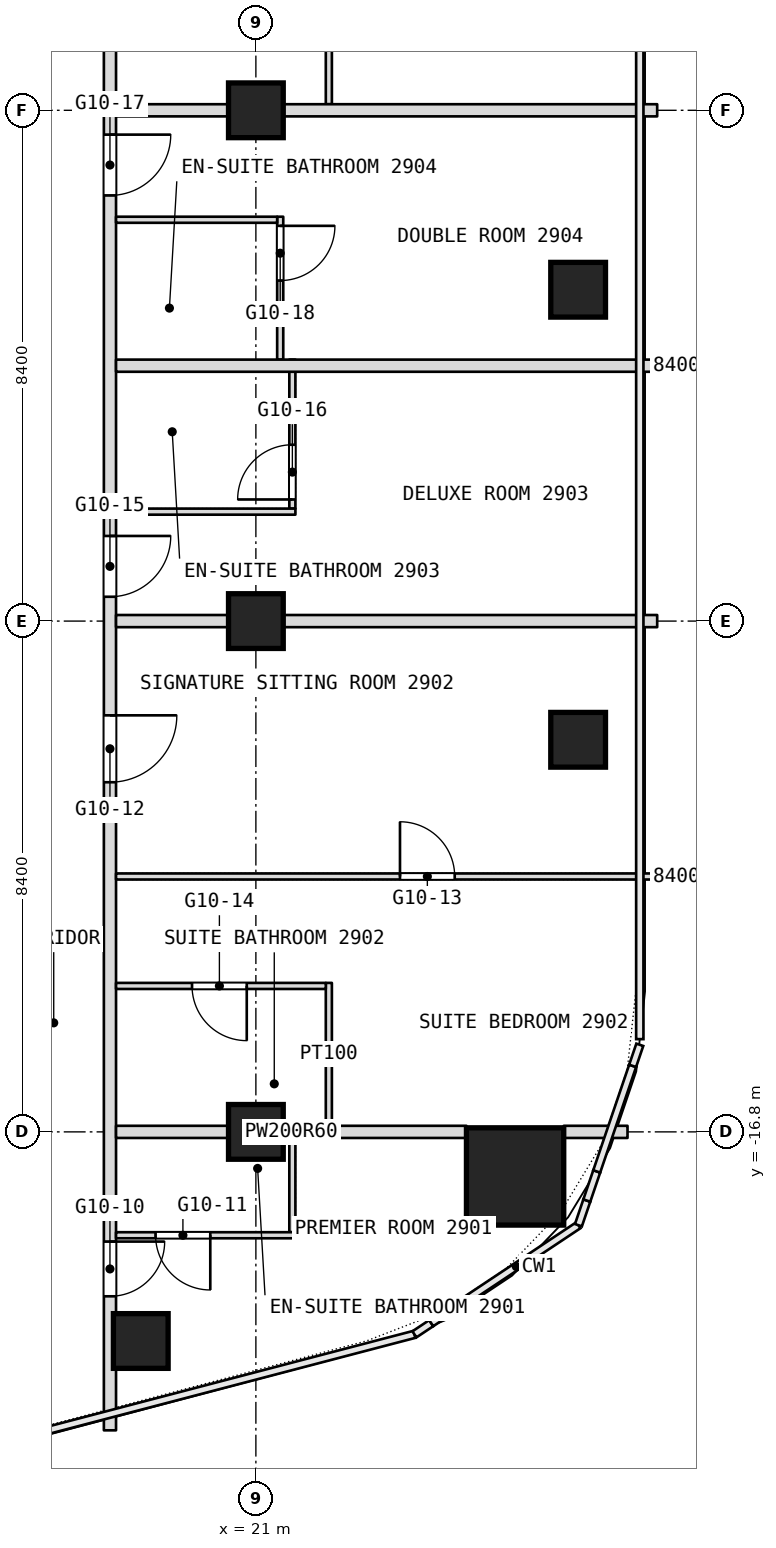
"""IFC4 building model, lengths in metres.
Left out: names, types, materials, properties, quantities, classifications, styles, units other than length and angle.
Written with IfcOpenShell. Run it as: python <this file> out.ifc"""

import sys

from ifc_helpers import new_model, si_unit, direction, frame, frame_2d, origin, origin_2d, place, context, subcontext, project, spatial, rectangle, extrude, element, fill, save


model = new_model("IFC4")
c1 = context("Model", 3, precision=1e-05, world=origin(), true_north=direction((0.0, 1.0)))
c2 = subcontext(c1, "Body", "Model", "MODEL_VIEW")
j1 = project(units=[si_unit("LENGTHUNIT", "METRE"), si_unit("PLANEANGLEUNIT", "RADIAN")], contexts=[c1])
p1 = place(None, origin())
s1 = spatial("IfcSite", under=j1, at=p1, CompositionType="ELEMENT")
p2 = place(p1, origin())
s2 = spatial("IfcBuilding", under=s1, at=p2, CompositionType="ELEMENT")
p3 = place(p2, frame((0.0, 0.0, 130.1)))
s3 = spatial("IfcBuildingStorey", under=s2, at=p3, CompositionType="ELEMENT", Elevation=130.1)
p4 = place(p3, frame((25.263, -17.533, 0.0), z_axis=(0.0, 0.0, 1.0), x_axis=(1.0, 0.0, 0.0)))
e1 = element("IfcColumn", 1, at=p4, inside=s3, PredefinedType="COLUMN", context=c2, shape_type="SweptSolid", body=[
    extrude(rectangle(XDim=1.6, YDim=1.6, at=origin_2d()), origin(), (0.0, 0.0, 1.0), 3.6),
])
for number, where, z_axis, x_axis in (
    (2, (21.0, -16.8, 0.0), (0.0, 0.0, 1.0), (1.0, 0.0, 0.0)),
    (3, (21.0, -8.4, 0.0), (0.0, 0.0, 1.0), (1.0, 0.0, 0.0)),
    (4, (21.0, 0.0, 0.0), (0.0, 0.0, 1.0), (1.0, 0.0, 0.0)),
    (5, (26.3, -2.951, 0.0), (0.0, 0.0, 1.0), (1.0, 0.0, 0.0)),
    (6, (26.3, -10.352, 0.0), (0.0, 0.0, 1.0), (1.0, 0.0, 0.0)),
    (7, (19.107, -20.239, 0.0), (0.0, 0.0, 1.0), (1.0, 0.0, 0.0)),
):
    element("IfcColumn", number, at=place(p3, frame(where, z_axis=z_axis, x_axis=x_axis)), inside=s3, PredefinedType="COLUMN", context=c2, shape_type="SweptSolid", body=[
        extrude(rectangle(XDim=0.9, YDim=0.9, at=origin_2d()), origin(), (0.0, 0.0, 1.0), 3.6),
    ])
p5 = place(p3, frame((22.2, -16.7, 0.0), z_axis=(0.0, 0.0, 1.0), x_axis=(0.0, 1.0, 0.0)))
e8 = element("IfcWall", 8, at=p5, inside=s3, PredefinedType="PARTITIONING", context=c2, shape_type="SweptSolid", body=[
    extrude(rectangle(XDim=2.35, YDim=0.1, at=frame_2d((1.175, 0.0))), origin(), (0.0, 0.0, 1.0), 3.34),
])
p6 = place(p3, frame((22.2, 0.1, 0.0), z_axis=(0.0, 0.0, 1.0), x_axis=(0.0, 1.0, 0.0)))
e9 = element("IfcWall", 9, at=p6, inside=s3, PredefinedType="PARTITIONING", context=c2, shape_type="SweptSolid", body=[
    extrude(rectangle(XDim=3.55, YDim=0.1, at=frame_2d((1.775, 0.0))), origin(), (0.0, 0.0, 1.0), 3.34),
])
p7 = place(p6, frame((2.5, 0.0, 0.0)))
e10 = element("IfcOpeningElement", 10, at=p7, cuts=e9, PredefinedType="OPENING", context=c2, shape_type="SweptSolid", body=[
    extrude(rectangle(XDim=0.9, YDim=2.1, at=frame_2d((0.45, 1.05))), frame((0.0, 0.05, 0.0), z_axis=(0.0, -1.0, 0.0), x_axis=(1.0, 0.0, 0.0)), (0.0, 0.0, 1.0), 0.1),
])
p8 = place(p3, frame((21.6, -18.45, 0.0), z_axis=(0.0, 0.0, 1.0), x_axis=(0.0, 1.0, 0.0)))
e11 = element("IfcWall", 11, at=p8, inside=s3, PredefinedType="PARTITIONING", context=c2, shape_type="SweptSolid", body=[
    extrude(rectangle(XDim=1.75, YDim=0.1, at=frame_2d((0.875, 0.0))), origin(), (0.0, 0.0, 1.0), 3.34),
])
p9 = place(p3, frame((21.6, -6.55, 0.0), z_axis=(0.0, 0.0, 1.0), x_axis=(0.0, 1.0, 0.0)))
e12 = element("IfcWall", 12, at=p9, inside=s3, PredefinedType="PARTITIONING", context=c2, shape_type="SweptSolid", body=[
    extrude(rectangle(XDim=2.45, YDim=0.1, at=frame_2d((1.225, 0.0))), origin(), (0.0, 0.0, 1.0), 3.34),
])
p10 = place(p9, frame((0.15, 0.0, 0.0)))
e13 = element("IfcOpeningElement", 13, at=p10, cuts=e12, PredefinedType="OPENING", context=c2, shape_type="SweptSolid", body=[
    extrude(rectangle(XDim=0.9, YDim=2.1, at=frame_2d((0.45, 1.05))), frame((0.0, 0.05, 0.0), z_axis=(0.0, -1.0, 0.0), x_axis=(1.0, 0.0, 0.0)), (0.0, 0.0, 1.0), 0.1),
])
p11 = place(p3, frame((21.4, -4.1, 0.0), z_axis=(0.0, 0.0, 1.0), x_axis=(0.0, 1.0, 0.0)))
e14 = element("IfcWall", 14, at=p11, inside=s3, PredefinedType="PARTITIONING", context=c2, shape_type="SweptSolid", body=[
    extrude(rectangle(XDim=2.35, YDim=0.1, at=frame_2d((1.175, 0.0))), origin(), (0.0, 0.0, 1.0), 3.34),
])
p12 = place(p11, frame((1.3, 0.0, 0.0)))
e15 = element("IfcOpeningElement", 15, at=p12, cuts=e14, PredefinedType="OPENING", context=c2, shape_type="SweptSolid", body=[
    extrude(rectangle(XDim=0.9, YDim=2.1, at=frame_2d((0.45, 1.05))), frame((0.0, 0.05, 0.0), z_axis=(0.0, -1.0, 0.0), x_axis=(1.0, 0.0, 0.0)), (0.0, 0.0, 1.0), 0.1),
])
p13 = place(p3, frame((18.6, -21.708, 0.0), z_axis=(0.0, 0.0, 1.0), x_axis=(0.0, 1.0, 0.0)))
e16 = element("IfcWall", 16, at=p13, inside=s3, PredefinedType="PARTITIONING", context=c2, shape_type="SweptSolid", body=[
    extrude(rectangle(XDim=49.648, YDim=0.2, at=frame_2d((24.824, 0.0))), origin(), (0.0, 0.0, 1.0), 3.34),
])
p14 = place(p13, frame((2.204, 0.0, 0.0)))
e17 = element("IfcOpeningElement", 17, at=p14, cuts=e16, PredefinedType="OPENING", context=c2, shape_type="SweptSolid", body=[
    extrude(rectangle(XDim=0.9, YDim=2.1, at=frame_2d((0.45, 1.05))), frame((0.0, 0.1, 0.0), z_axis=(0.0, -1.0, 0.0), x_axis=(1.0, 0.0, 0.0)), (0.0, 0.0, 1.0), 0.2),
])
p15 = place(p13, frame((10.658, 0.0, 0.0)))
e18 = element("IfcOpeningElement", 18, at=p15, cuts=e16, PredefinedType="OPENING", context=c2, shape_type="SweptSolid", body=[
    extrude(rectangle(XDim=1.1, YDim=2.1, at=frame_2d((0.55, 1.05))), frame((0.0, 0.1, 0.0), z_axis=(0.0, -1.0, 0.0), x_axis=(1.0, 0.0, 0.0)), (0.0, 0.0, 1.0), 0.2),
])
p16 = place(p13, frame((13.708, 0.0, 0.0)))
e19 = element("IfcOpeningElement", 19, at=p16, cuts=e16, PredefinedType="OPENING", context=c2, shape_type="SweptSolid", body=[
    extrude(rectangle(XDim=1.0, YDim=2.1, at=frame_2d((0.5, 1.05))), frame((0.0, 0.1, 0.0), z_axis=(0.0, -1.0, 0.0), x_axis=(1.0, 0.0, 0.0)), (0.0, 0.0, 1.0), 0.2),
])
p17 = place(p13, frame((20.308, 0.0, 0.0)))
e20 = element("IfcOpeningElement", 20, at=p17, cuts=e16, PredefinedType="OPENING", context=c2, shape_type="SweptSolid", body=[
    extrude(rectangle(XDim=1.0, YDim=2.1, at=frame_2d((0.5, 1.05))), frame((0.0, 0.1, 0.0), z_axis=(0.0, -1.0, 0.0), x_axis=(1.0, 0.0, 0.0)), (0.0, 0.0, 1.0), 0.2),
])
p18 = place(p13, frame((25.408, 0.0, 0.0)))
e21 = element("IfcOpeningElement", 21, at=p18, cuts=e16, PredefinedType="OPENING", context=c2, shape_type="SweptSolid", body=[
    extrude(rectangle(XDim=1.1, YDim=2.1, at=frame_2d((0.55, 1.05))), frame((0.0, 0.1, 0.0), z_axis=(0.0, -1.0, 0.0), x_axis=(1.0, 0.0, 0.0)), (0.0, 0.0, 1.0), 0.2),
])
p19 = place(p13, frame((30.508, 0.0, 0.0)))
e22 = element("IfcOpeningElement", 22, at=p19, cuts=e16, PredefinedType="OPENING", context=c2, shape_type="SweptSolid", body=[
    extrude(rectangle(XDim=1.0, YDim=2.1, at=frame_2d((0.5, 1.05))), frame((0.0, 0.1, 0.0), z_axis=(0.0, -1.0, 0.0), x_axis=(1.0, 0.0, 0.0)), (0.0, 0.0, 1.0), 0.2),
])
p20 = place(p13, frame((37.108, 0.0, 0.0)))
e23 = element("IfcOpeningElement", 23, at=p20, cuts=e16, PredefinedType="OPENING", context=c2, shape_type="SweptSolid", body=[
    extrude(rectangle(XDim=1.0, YDim=2.1, at=frame_2d((0.5, 1.05))), frame((0.0, 0.1, 0.0), z_axis=(0.0, -1.0, 0.0), x_axis=(1.0, 0.0, 0.0)), (0.0, 0.0, 1.0), 0.2),
])
p21 = place(p13, frame((42.608, 0.0, 0.0)))
e24 = element("IfcOpeningElement", 24, at=p21, cuts=e16, PredefinedType="OPENING", context=c2, shape_type="SweptSolid", body=[
    extrude(rectangle(XDim=1.0, YDim=2.1, at=frame_2d((0.5, 1.05))), frame((0.0, 0.1, 0.0), z_axis=(0.0, -1.0, 0.0), x_axis=(1.0, 0.0, 0.0)), (0.0, 0.0, 1.0), 0.2),
])
p22 = place(p13, frame((44.608, 0.0, 0.0)))
e25 = element("IfcOpeningElement", 25, at=p22, cuts=e16, PredefinedType="OPENING", context=c2, shape_type="SweptSolid", body=[
    extrude(rectangle(XDim=1.0, YDim=2.1, at=frame_2d((0.5, 1.05))), frame((0.0, 0.1, 0.0), z_axis=(0.0, -1.0, 0.0), x_axis=(1.0, 0.0, 0.0)), (0.0, 0.0, 1.0), 0.2),
])
p23 = place(p3, frame((18.7, -18.5, 0.0), z_axis=(0.0, 0.0, 1.0), x_axis=(1.0, 0.0, 0.0)))
e26 = element("IfcWall", 26, at=p23, inside=s3, PredefinedType="PARTITIONING", context=c2, shape_type="SweptSolid", body=[
    extrude(rectangle(XDim=2.95, YDim=0.1, at=frame_2d((1.475, 0.0))), origin(), (0.0, 0.0, 1.0), 3.34),
])
p24 = place(p23, frame((0.65, 0.0, 0.0)))
e27 = element("IfcOpeningElement", 27, at=p24, cuts=e26, PredefinedType="OPENING", context=c2, shape_type="SweptSolid", body=[
    extrude(rectangle(XDim=0.9, YDim=2.1, at=frame_2d((0.45, 1.05))), frame((0.0, 0.05, 0.0), z_axis=(0.0, -1.0, 0.0), x_axis=(1.0, 0.0, 0.0)), (0.0, 0.0, 1.0), 0.1),
])
p25 = place(p3, frame((18.7, -16.8, 0.0), z_axis=(0.0, 0.0, 1.0), x_axis=(1.0, 0.0, 0.0)))
e28 = element("IfcWall", 28, at=p25, inside=s3, PredefinedType="PARTITIONING", context=c2, shape_type="SweptSolid", body=[
    extrude(rectangle(XDim=5.763, YDim=0.2, at=frame_2d((2.881, 0.0))), origin(), (0.0, 0.0, 1.0), 2.89),
])
p26 = place(p3, frame((26.063, -16.8, 0.0), z_axis=(0.0, 0.0, 1.0), x_axis=(1.0, 0.0, 0.0)))
e29 = element("IfcWall", 29, at=p26, inside=s3, PredefinedType="PARTITIONING", context=c2, shape_type="SweptSolid", body=[
    extrude(rectangle(XDim=1.049, YDim=0.2, at=frame_2d((0.524, 0.0))), origin(), (0.0, 0.0, 1.0), 3.34),
])
p27 = place(p3, frame((18.7, -14.4, 0.0), z_axis=(0.0, 0.0, 1.0), x_axis=(1.0, 0.0, 0.0)))
e30 = element("IfcWall", 30, at=p27, inside=s3, PredefinedType="PARTITIONING", context=c2, shape_type="SweptSolid", body=[
    extrude(rectangle(XDim=3.45, YDim=0.1, at=frame_2d((1.725, 0.0))), origin(), (0.0, 0.0, 1.0), 3.34),
])
p28 = place(p27, frame((1.25, 0.0, 0.0)))
e31 = element("IfcOpeningElement", 31, at=p28, cuts=e30, PredefinedType="OPENING", context=c2, shape_type="SweptSolid", body=[
    extrude(rectangle(XDim=0.9, YDim=2.1, at=frame_2d((0.45, 1.05))), frame((0.0, 0.05, 0.0), z_axis=(0.0, -1.0, 0.0), x_axis=(1.0, 0.0, 0.0)), (0.0, 0.0, 1.0), 0.1),
])
p29 = place(p3, frame((18.7, -12.6, 0.0), z_axis=(0.0, 0.0, 1.0), x_axis=(1.0, 0.0, 0.0)))
e32 = element("IfcWall", 32, at=p29, inside=s3, PredefinedType="PARTITIONING", context=c2, shape_type="SweptSolid", body=[
    extrude(rectangle(XDim=8.9, YDim=0.1, at=frame_2d((4.45, 0.0))), origin(), (0.0, 0.0, 1.0), 3.34),
])
p30 = place(p29, frame((4.67, 0.0, 0.0)))
e33 = element("IfcOpeningElement", 33, at=p30, cuts=e32, PredefinedType="OPENING", context=c2, shape_type="SweptSolid", body=[
    extrude(rectangle(XDim=0.9, YDim=2.1, at=frame_2d((0.45, 1.05))), frame((0.0, 0.05, 0.0), z_axis=(0.0, -1.0, 0.0), x_axis=(1.0, 0.0, 0.0)), (0.0, 0.0, 1.0), 0.1),
])
p31 = place(p3, frame((18.7, -8.4, 0.0), z_axis=(0.0, 0.0, 1.0), x_axis=(1.0, 0.0, 0.0)))
e34 = element("IfcWall", 34, at=p31, inside=s3, PredefinedType="PARTITIONING", context=c2, shape_type="SweptSolid", body=[
    extrude(rectangle(XDim=8.9, YDim=0.2, at=frame_2d((4.45, 0.0))), origin(), (0.0, 0.0, 1.0), 2.89),
])
p32 = place(p3, frame((18.7, -6.6, 0.0), z_axis=(0.0, 0.0, 1.0), x_axis=(1.0, 0.0, 0.0)))
e35 = element("IfcWall", 35, at=p32, inside=s3, PredefinedType="PARTITIONING", context=c2, shape_type="SweptSolid", body=[
    extrude(rectangle(XDim=2.95, YDim=0.1, at=frame_2d((1.475, 0.0))), origin(), (0.0, 0.0, 1.0), 3.34),
])
p33 = place(p3, frame((18.7, -4.2, 0.0), z_axis=(0.0, 0.0, 1.0), x_axis=(1.0, 0.0, 0.0)))
e36 = element("IfcWall", 36, at=p33, inside=s3, PredefinedType="PARTITIONING", context=c2, shape_type="SweptSolid", body=[
    extrude(rectangle(XDim=8.9, YDim=0.2, at=frame_2d((4.45, 0.0))), origin(), (0.0, 0.0, 1.0), 3.34),
])
p34 = place(p3, frame((18.7, -1.8, 0.0), z_axis=(0.0, 0.0, 1.0), x_axis=(1.0, 0.0, 0.0)))
e37 = element("IfcWall", 37, at=p34, inside=s3, PredefinedType="PARTITIONING", context=c2, shape_type="SweptSolid", body=[
    extrude(rectangle(XDim=2.65, YDim=0.1, at=frame_2d((1.325, 0.0))), origin(), (0.0, 0.0, 1.0), 3.34),
])
p35 = place(p3, frame((18.7, 0.0, 0.0), z_axis=(0.0, 0.0, 1.0), x_axis=(1.0, 0.0, 0.0)))
e38 = element("IfcWall", 38, at=p35, inside=s3, PredefinedType="PARTITIONING", context=c2, shape_type="SweptSolid", body=[
    extrude(rectangle(XDim=8.9, YDim=0.2, at=frame_2d((4.45, 0.0))), origin(), (0.0, 0.0, 1.0), 2.89),
])
p36 = place(p10, origin())
e39 = element("IfcDoor", 39, at=p36, inside=s3, OperationType="SINGLE_SWING_LEFT", PredefinedType="DOOR", context=c2, shape_type="SweptSolid", body=[
    extrude(rectangle(XDim=0.9, YDim=2.1, at=frame_2d((0.45, 1.05))), frame((0.0, 0.025, 0.0), z_axis=(0.0, -1.0, 0.0), x_axis=(1.0, 0.0, 0.0)), (0.0, 0.0, 1.0), 0.05),
])
fill(e13, e39)
p37 = place(p12, origin())
e40 = element("IfcDoor", 40, at=p37, inside=s3, OperationType="SINGLE_SWING_RIGHT", PredefinedType="DOOR", context=c2, shape_type="SweptSolid", body=[
    extrude(rectangle(XDim=0.9, YDim=2.1, at=frame_2d((0.45, 1.05))), frame((0.0, 0.025, 0.0), z_axis=(0.0, -1.0, 0.0), x_axis=(1.0, 0.0, 0.0)), (0.0, 0.0, 1.0), 0.05),
])
fill(e15, e40)
p38 = place(p14, origin())
e41 = element("IfcDoor", 41, at=p38, inside=s3, OperationType="SINGLE_SWING_LEFT", PredefinedType="DOOR", context=c2, shape_type="SweptSolid", body=[
    extrude(rectangle(XDim=0.9, YDim=2.1, at=frame_2d((0.45, 1.05))), frame((0.0, 0.025, 0.0), z_axis=(0.0, -1.0, 0.0), x_axis=(1.0, 0.0, 0.0)), (0.0, 0.0, 1.0), 0.05),
])
fill(e17, e41)
p39 = place(p15, origin())
e42 = element("IfcDoor", 42, at=p39, inside=s3, OperationType="SINGLE_SWING_RIGHT", PredefinedType="DOOR", context=c2, shape_type="SweptSolid", body=[
    extrude(rectangle(XDim=1.1, YDim=2.1, at=frame_2d((0.55, 1.05))), frame((0.0, 0.025, 0.0), z_axis=(0.0, -1.0, 0.0), x_axis=(1.0, 0.0, 0.0)), (0.0, 0.0, 1.0), 0.05),
])
fill(e18, e42)
p40 = place(p16, origin())
e43 = element("IfcDoor", 43, at=p40, inside=s3, OperationType="SINGLE_SWING_LEFT", PredefinedType="DOOR", context=c2, shape_type="SweptSolid", body=[
    extrude(rectangle(XDim=1.0, YDim=2.1, at=frame_2d((0.5, 1.05))), frame((0.0, 0.025, 0.0), z_axis=(0.0, -1.0, 0.0), x_axis=(1.0, 0.0, 0.0)), (0.0, 0.0, 1.0), 0.05),
])
fill(e19, e43)
p41 = place(p17, origin())
e44 = element("IfcDoor", 44, at=p41, inside=s3, OperationType="SINGLE_SWING_LEFT", PredefinedType="DOOR", context=c2, shape_type="SweptSolid", body=[
    extrude(rectangle(XDim=1.0, YDim=2.1, at=frame_2d((0.5, 1.05))), frame((0.0, 0.025, 0.0), z_axis=(0.0, -1.0, 0.0), x_axis=(1.0, 0.0, 0.0)), (0.0, 0.0, 1.0), 0.05),
])
fill(e20, e44)
p42 = place(p24, origin())
e45 = element("IfcDoor", 45, at=p42, inside=s3, OperationType="SINGLE_SWING_LEFT", PredefinedType="DOOR", context=c2, shape_type="SweptSolid", body=[
    extrude(rectangle(XDim=0.9, YDim=2.1, at=frame_2d((0.45, 1.05))), frame((0.0, 0.025, 0.0), z_axis=(0.0, -1.0, 0.0), x_axis=(1.0, 0.0, 0.0)), (0.0, 0.0, 1.0), 0.05),
])
fill(e27, e45)
p43 = place(p28, origin())
e46 = element("IfcDoor", 46, at=p43, inside=s3, OperationType="SINGLE_SWING_RIGHT", PredefinedType="DOOR", context=c2, shape_type="SweptSolid", body=[
    extrude(rectangle(XDim=0.9, YDim=2.1, at=frame_2d((0.45, 1.05))), frame((0.0, 0.025, 0.0), z_axis=(0.0, -1.0, 0.0), x_axis=(1.0, 0.0, 0.0)), (0.0, 0.0, 1.0), 0.05),
])
fill(e31, e46)
p44 = place(p30, origin())
e47 = element("IfcDoor", 47, at=p44, inside=s3, OperationType="SINGLE_SWING_RIGHT", PredefinedType="DOOR", context=c2, shape_type="SweptSolid", body=[
    extrude(rectangle(XDim=0.9, YDim=2.1, at=frame_2d((0.45, 1.05))), frame((0.0, 0.025, 0.0), z_axis=(0.0, -1.0, 0.0), x_axis=(1.0, 0.0, 0.0)), (0.0, 0.0, 1.0), 0.05),
])
fill(e33, e47)
save(model, sys.argv[1])
